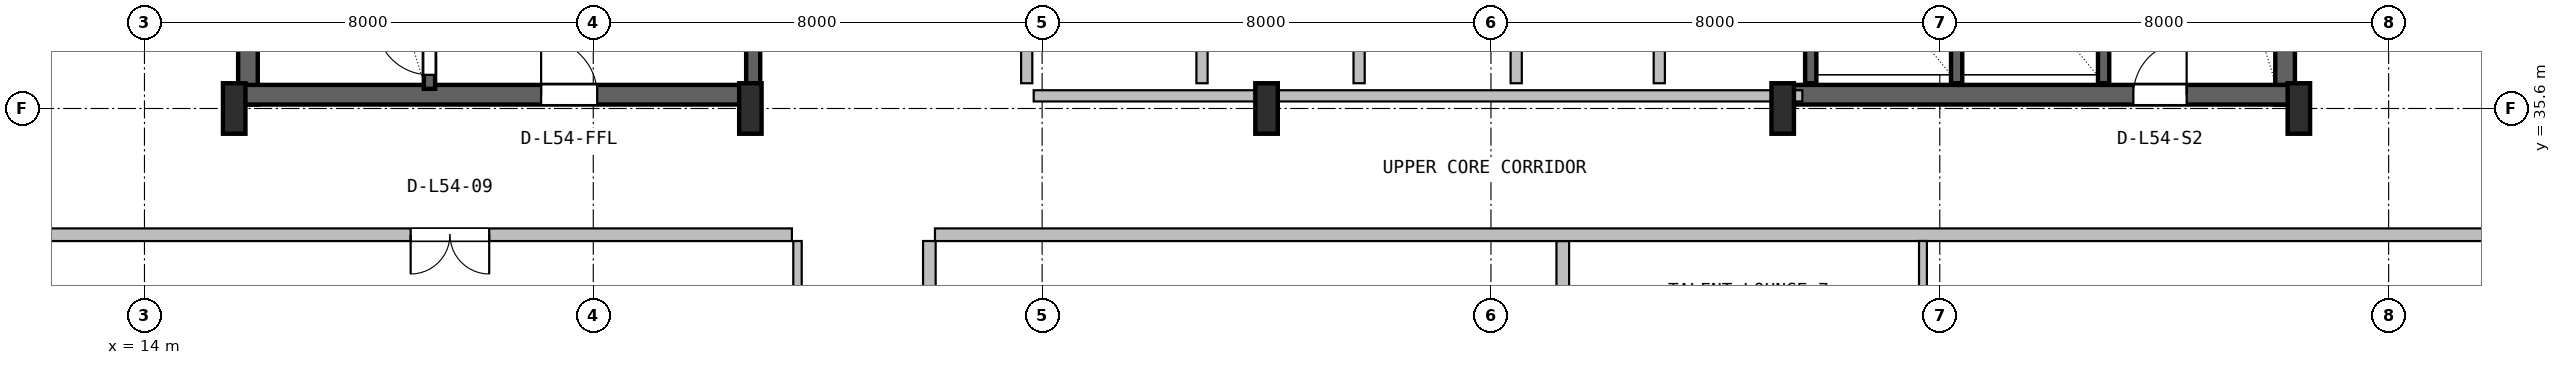
"""IFC4 building model, lengths in metres.
Left out: names, types, materials, properties, quantities, classifications, styles, units other than length and angle.
Written with IfcOpenShell. Run it as: python <this file> out.ifc"""

import sys

from ifc_helpers import new_model, si_unit, direction, frame, frame_2d, origin, origin_2d, place, context, subcontext, project, spatial, rectangle, i_section, extrude, source, transform, mapped, element, fill, save


model = new_model("IFC4")
c1 = context("Model", 3, precision=1e-05, world=origin(), true_north=direction((0.0, 1.0)))
c2 = subcontext(c1, "Body", "Model", "MODEL_VIEW")
j1 = project(units=[si_unit("LENGTHUNIT", "METRE"), si_unit("PLANEANGLEUNIT", "RADIAN")], contexts=[c1])
p1 = place(None, origin())
s1 = spatial("IfcSite", under=j1, at=p1, CompositionType="ELEMENT")
p2 = place(p1, origin())
s2 = spatial("IfcBuilding", under=s1, at=p2, CompositionType="ELEMENT")
p3 = place(p2, frame((0.0, 0.0, 218.8)))
s3 = spatial("IfcBuildingStorey", under=s2, at=p3, CompositionType="ELEMENT", Elevation=218.8)
for number, where, z_axis, x_axis in (
    (1, (15.845, 35.67, 0.0), (0.0, 0.0, 1.0), (0.0, 1.0, 0.0)),
    (2, (52.155, 35.67, 0.0), (0.0, 0.0, 1.0), (0.0, 1.0, 0.0)),
):
    element("IfcWall", number, at=place(p3, frame(where, z_axis=z_axis, x_axis=x_axis)), inside=s3, PredefinedType="SHEAR", context=c2, shape_type="SweptSolid", body=[
        extrude(rectangle(XDim=11.13, YDim=0.35, at=frame_2d((5.565, 0.0))), origin(), (0.0, 0.0, 1.0), 3.55),
    ])
p4 = place(p3, frame((15.67, 35.845, 0.0), z_axis=(0.0, 0.0, 1.0), x_axis=(1.0, 0.0, 0.0)))
e3 = element("IfcWall", 3, at=p4, inside=s3, PredefinedType="SHEAR", context=c2, shape_type="SweptSolid", body=[
    extrude(rectangle(XDim=9.13, YDim=0.35, at=frame_2d((4.565, 0.0))), origin(), (0.0, 0.0, 1.0), 3.55),
])
p5 = place(p4, frame((5.4, 0.0, 0.0)))
e4 = element("IfcOpeningElement", 4, at=p5, cuts=e3, PredefinedType="OPENING", context=c2, shape_type="SweptSolid", body=[
    extrude(rectangle(XDim=1.0, YDim=2.1, at=frame_2d((0.5, 1.05))), frame((0.0, 0.185, 0.0), z_axis=(0.0, -1.0, 0.0), x_axis=(1.0, 0.0, 0.0)), (0.0, 0.0, 1.0), 0.37),
])
p6 = place(p3, frame((43.2, 35.845, 0.0), z_axis=(0.0, 0.0, 1.0), x_axis=(1.0, 0.0, 0.0)))
e5 = element("IfcWall", 5, at=p6, inside=s3, PredefinedType="SHEAR", context=c2, shape_type="SweptSolid", body=[
    extrude(rectangle(XDim=9.13, YDim=0.35, at=frame_2d((4.565, 0.0))), origin(), (0.0, 0.0, 1.0), 3.55),
])
p7 = place(p6, frame((6.25, 0.0, 0.0)))
e6 = element("IfcOpeningElement", 6, at=p7, cuts=e5, PredefinedType="OPENING", context=c2, shape_type="SweptSolid", body=[
    extrude(rectangle(XDim=0.95, YDim=2.1, at=frame_2d((0.475, 1.05))), frame((0.0, 0.185, 0.0), z_axis=(0.0, -1.0, 0.0), x_axis=(1.0, 0.0, 0.0)), (0.0, 0.0, 1.0), 0.37),
])
m1 = source(origin(), c2, "Body", "SweptSolid", [
    extrude(i_section(OverallWidth=0.4, OverallDepth=0.9, WebThickness=0.016, FlangeThickness=0.028, FilletRadius=0.016, at=origin_2d()), origin(), (0.0, 0.0, 1.0), 3.8),
])
for number, where, z_axis, x_axis in (
    (7, (15.6, 35.6, 0.0), (0.0, 0.0, 1.0), (1.0, 0.0, 0.0)),
    (8, (24.8, 35.6, 0.0), (0.0, 0.0, 1.0), (1.0, 0.0, 0.0)),
    (9, (34.0, 35.6, 0.0), (0.0, 0.0, 1.0), (1.0, 0.0, 0.0)),
    (10, (43.2, 35.6, 0.0), (0.0, 0.0, 1.0), (1.0, 0.0, 0.0)),
    (11, (52.4, 35.6, 0.0), (0.0, 0.0, 1.0), (1.0, 0.0, 0.0)),
):
    element("IfcColumn", number, at=place(p3, frame(where, z_axis=z_axis, x_axis=x_axis)), inside=s3, PredefinedType="COLUMN", context=c2, shape_type="MappedRepresentation", body=[
        mapped(m1, transform((0.0, 0.0, 0.0), x_axis=(1.0, 0.0, 0.0), y_axis=(0.0, 1.0, 0.0), z_axis=(0.0, 0.0, 1.0), scale=1.0)),
    ])
p8 = place(p3, frame((19.08, 35.95, 0.0), z_axis=(0.0, 0.0, 1.0), x_axis=(0.0, 1.0, 0.0)))
e12 = element("IfcWall", 12, at=p8, inside=s3, PredefinedType="SHEAR", context=c2, shape_type="SweptSolid", body=[
    extrude(rectangle(XDim=9.65, YDim=0.2, at=frame_2d((4.825, 0.0))), origin(), (0.0, 0.0, 1.0), 3.55),
])
p9 = place(p8, frame((0.25, 0.0, 0.0)))
e13 = element("IfcOpeningElement", 13, at=p9, cuts=e12, PredefinedType="OPENING", context=c2, shape_type="SweptSolid", body=[
    extrude(rectangle(XDim=0.95, YDim=2.1, at=frame_2d((0.475, 1.05))), frame((0.0, 0.11, 0.0), z_axis=(0.0, -1.0, 0.0), x_axis=(1.0, 0.0, 0.0)), (0.0, 0.0, 1.0), 0.22),
])
p10 = place(p3, frame((24.85, 36.05, 0.0), z_axis=(0.0, 0.0, 1.0), x_axis=(0.0, 1.0, 0.0)))
e14 = element("IfcWall", 14, at=p10, inside=s3, PredefinedType="SHEAR", context=c2, shape_type="SweptSolid", body=[
    extrude(rectangle(XDim=10.45, YDim=0.25, at=frame_2d((5.225, 0.0))), origin(), (0.0, 0.0, 1.0), 3.55),
])
p11 = place(p3, frame((48.92, 36.05, 0.0), z_axis=(0.0, 0.0, 1.0), x_axis=(0.0, 1.0, 0.0)))
e15 = element("IfcWall", 15, at=p11, inside=s3, PredefinedType="SHEAR", context=c2, shape_type="SweptSolid", body=[
    extrude(rectangle(XDim=10.5, YDim=0.2, at=frame_2d((5.25, 0.0))), origin(), (0.0, 0.0, 1.0), 3.55),
])
for number, where, z_axis, x_axis in (
    (16, (43.7, 36.05, 0.0), (0.0, 0.0, 1.0), (0.0, 1.0, 0.0)),
    (17, (46.3, 36.05, 0.0), (0.0, 0.0, 1.0), (0.0, 1.0, 0.0)),
):
    element("IfcWall", number, at=place(p3, frame(where, z_axis=z_axis, x_axis=x_axis)), inside=s3, PredefinedType="SHEAR", context=c2, shape_type="SweptSolid", body=[
        extrude(rectangle(XDim=3.05, YDim=0.2, at=frame_2d((1.525, 0.0))), origin(), (0.0, 0.0, 1.0), 3.55),
    ])
p12 = place(p3, frame((29.85, 35.825, 0.0), z_axis=(0.0, 0.0, 1.0), x_axis=(1.0, 0.0, 0.0)))
e18 = element("IfcWall", 18, at=p12, inside=s3, PredefinedType="SOLIDWALL", context=c2, shape_type="SweptSolid", body=[
    extrude(rectangle(XDim=13.7, YDim=0.2, at=frame_2d((6.85, 0.0))), origin(), (0.0, 0.0, 1.0), 2.575),
])
for number, where, z_axis, x_axis in (
    (19, (32.85, 36.05, 0.0), (0.0, 0.0, 1.0), (0.0, 1.0, 0.0)),
    (20, (29.725, 36.05, 0.0), (0.0, 0.0, 1.0), (0.0, 1.0, 0.0)),
    (21, (35.65, 36.05, 0.0), (0.0, 0.0, 1.0), (0.0, 1.0, 0.0)),
    (22, (38.45, 36.05, 0.0), (0.0, 0.0, 1.0), (0.0, 1.0, 0.0)),
):
    element("IfcWall", number, at=place(p3, frame(where, z_axis=z_axis, x_axis=x_axis)), inside=s3, PredefinedType="PLUMBINGWALL", context=c2, shape_type="SweptSolid", body=[
        extrude(rectangle(XDim=3.1, YDim=0.2, at=frame_2d((1.55, 0.0))), origin(), (0.0, 0.0, 1.0), 3.53),
    ])
p13 = place(p3, frame((41.0, 36.05, 0.0), z_axis=(0.0, 0.0, 1.0), x_axis=(0.0, 1.0, 0.0)))
e23 = element("IfcWall", 23, at=p13, inside=s3, PredefinedType="SOLIDWALL", context=c2, shape_type="SweptSolid", body=[
    extrude(rectangle(XDim=3.1, YDim=0.2, at=frame_2d((1.55, 0.0))), origin(), (0.0, 0.0, 1.0), 3.53),
])
p14 = place(p3, frame((25.64, 10.38, 0.0), z_axis=(0.0, 0.0, 1.0), x_axis=(0.0, 1.0, 0.0)))
e24 = element("IfcWall", 24, at=p14, inside=s3, PredefinedType="PARTITIONING", context=c2, shape_type="SweptSolid", body=[
    extrude(rectangle(XDim=22.858, YDim=0.15, at=frame_2d((11.429, 0.0))), origin(), (0.0, 0.0, 1.0), 2.908),
])
p15 = place(p14, frame((2.35, 0.0, 0.0)))
e25 = element("IfcOpeningElement", 25, at=p15, cuts=e24, PredefinedType="OPENING", context=c2, shape_type="SweptSolid", body=[
    extrude(rectangle(XDim=0.88, YDim=2.06, at=frame_2d((0.44, 1.03))), frame((0.0, 0.085, 0.0), z_axis=(0.0, -1.0, 0.0), x_axis=(1.0, 0.0, 0.0)), (0.0, 0.0, 1.0), 0.17),
])
p16 = place(p14, frame((7.26, 0.0, 0.0)))
e26 = element("IfcOpeningElement", 26, at=p16, cuts=e24, PredefinedType="OPENING", context=c2, shape_type="SweptSolid", body=[
    extrude(rectangle(XDim=1.05, YDim=2.1, at=frame_2d((0.525, 1.05))), frame((0.0, 0.085, 0.0), z_axis=(0.0, -1.0, 0.0), x_axis=(1.0, 0.0, 0.0)), (0.0, 0.0, 1.0), 0.17),
])
p17 = place(p14, frame((14.45, 0.0, 0.0)))
e27 = element("IfcOpeningElement", 27, at=p17, cuts=e24, PredefinedType="OPENING", context=c2, shape_type="SweptSolid", body=[
    extrude(rectangle(XDim=1.4, YDim=2.12, at=frame_2d((0.7, 1.06))), frame((0.0, 0.085, 0.0), z_axis=(0.0, -1.0, 0.0), x_axis=(1.0, 0.0, 0.0)), (0.0, 0.0, 1.0), 0.17),
])
p18 = place(p3, frame((9.68, 33.35, 0.0), z_axis=(0.0, 0.0, 1.0), x_axis=(1.0, 0.0, 0.0)))
e28 = element("IfcWall", 28, at=p18, inside=s3, PredefinedType="PARTITIONING", context=c2, shape_type="SweptSolid", body=[
    extrude(rectangle(XDim=15.86, YDim=0.225, at=frame_2d((7.93, 0.0))), origin(), (0.0, 0.0, 1.0), 2.908),
])
p19 = place(p18, frame((9.065, 0.0, 0.0)))
e29 = element("IfcOpeningElement", 29, at=p19, cuts=e28, PredefinedType="OPENING", context=c2, shape_type="SweptSolid", body=[
    extrude(rectangle(XDim=1.4, YDim=2.12, at=frame_2d((0.7, 1.06))), frame((0.0, 0.123, 0.0), z_axis=(0.0, -1.0, 0.0), x_axis=(1.0, 0.0, 0.0)), (0.0, 0.0, 1.0), 0.245),
])
p20 = place(p3, frame((39.28, 29.523, 0.0), z_axis=(0.0, 0.0, 1.0), x_axis=(0.0, 1.0, 0.0)))
e30 = element("IfcWall", 30, at=p20, inside=s3, PredefinedType="PARTITIONING", context=c2, shape_type="SweptSolid", body=[
    extrude(rectangle(XDim=3.715, YDim=0.225, at=frame_2d((1.857, 0.0))), origin(), (0.0, 0.0, 1.0), 3.53),
])
p21 = place(p3, frame((28.09, 33.35, 0.0), z_axis=(0.0, 0.0, 1.0), x_axis=(1.0, 0.0, 0.0)))
e31 = element("IfcWall", 31, at=p21, inside=s3, PredefinedType="PARTITIONING", context=c2, shape_type="SweptSolid", body=[
    extrude(rectangle(XDim=30.23, YDim=0.225, at=frame_2d((15.115, 0.0))), origin(), (0.0, 0.0, 1.0), 2.908),
])
p22 = place(p3, frame((27.99, 29.523, 0.0), z_axis=(0.0, 0.0, 1.0), x_axis=(0.0, 1.0, 0.0)))
e32 = element("IfcWall", 32, at=p22, inside=s3, PredefinedType="PARTITIONING", context=c2, shape_type="SweptSolid", body=[
    extrude(rectangle(XDim=3.715, YDim=0.225, at=frame_2d((1.857, 0.0))), origin(), (0.0, 0.0, 1.0), 3.53),
])
p23 = place(p3, frame((45.7, 29.523, 0.0), z_axis=(0.0, 0.0, 1.0), x_axis=(0.0, 1.0, 0.0)))
e33 = element("IfcWall", 33, at=p23, inside=s3, PredefinedType="PARTITIONING", context=c2, shape_type="SweptSolid", body=[
    extrude(rectangle(XDim=3.715, YDim=0.14, at=frame_2d((1.857, 0.0))), origin(), (0.0, 0.0, 1.0), 3.53),
])
m2 = source(origin(), c2, "Body", "SweptSolid", [
    extrude(rectangle(XDim=0.95, YDim=2.1, at=frame_2d((0.475, 1.05))), frame((0.0, 0.025, 0.0), z_axis=(0.0, -1.0, 0.0), x_axis=(1.0, 0.0, 0.0)), (0.0, 0.0, 1.0), 0.05),
])
p24 = place(p9, origin())
e34 = element("IfcDoor", 34, at=p24, inside=s3, OperationType="SINGLE_SWING_RIGHT", PredefinedType="DOOR", context=c2, shape_type="MappedRepresentation", body=[
    mapped(m2, transform((0.0, 0.0, 0.0), x_axis=(1.0, 0.0, 0.0), y_axis=(0.0, 1.0, 0.0), z_axis=(0.0, 0.0, 1.0), scale=1.0)),
])
fill(e13, e34)
m3 = source(origin(), c2, "Body", "SweptSolid", [
    extrude(rectangle(XDim=1.0, YDim=2.1, at=frame_2d((0.5, 1.05))), frame((0.0, 0.025, 0.0), z_axis=(0.0, -1.0, 0.0), x_axis=(1.0, 0.0, 0.0)), (0.0, 0.0, 1.0), 0.05),
])
p25 = place(p5, origin())
e35 = element("IfcDoor", 35, at=p25, inside=s3, OperationType="SINGLE_SWING_LEFT", PredefinedType="DOOR", context=c2, shape_type="MappedRepresentation", body=[
    mapped(m3, transform((0.0, 0.0, 0.0), x_axis=(1.0, 0.0, 0.0), y_axis=(0.0, 1.0, 0.0), z_axis=(0.0, 0.0, 1.0), scale=1.0)),
])
fill(e4, e35)
p26 = place(p7, origin())
e36 = element("IfcDoor", 36, at=p26, inside=s3, OperationType="SINGLE_SWING_RIGHT", PredefinedType="DOOR", context=c2, shape_type="MappedRepresentation", body=[
    mapped(m2, transform((0.0, 0.0, 0.0), x_axis=(1.0, 0.0, 0.0), y_axis=(0.0, 1.0, 0.0), z_axis=(0.0, 0.0, 1.0), scale=1.0)),
])
fill(e6, e36)
m4 = source(origin(), c2, "Body", "SweptSolid", [
    extrude(rectangle(XDim=1.4, YDim=2.12, at=frame_2d((0.7, 1.06))), frame((0.0, 0.025, 0.0), z_axis=(0.0, -1.0, 0.0), x_axis=(1.0, 0.0, 0.0)), (0.0, 0.0, 1.0), 0.05),
])
p27 = place(p19, frame((1.4, 0.0, 0.0), z_axis=(0.0, 0.0, 1.0), x_axis=(-1.0, 0.0, 0.0)))
e37 = element("IfcDoor", 37, at=p27, inside=s3, OperationType="DOUBLE_DOOR_SINGLE_SWING", PredefinedType="DOOR", context=c2, shape_type="MappedRepresentation", body=[
    mapped(m4, transform((0.0, 0.0, 0.0), x_axis=(1.0, 0.0, 0.0), y_axis=(0.0, 1.0, 0.0), z_axis=(0.0, 0.0, 1.0), scale=1.0)),
])
fill(e29, e37)
save(model, sys.argv[1])
